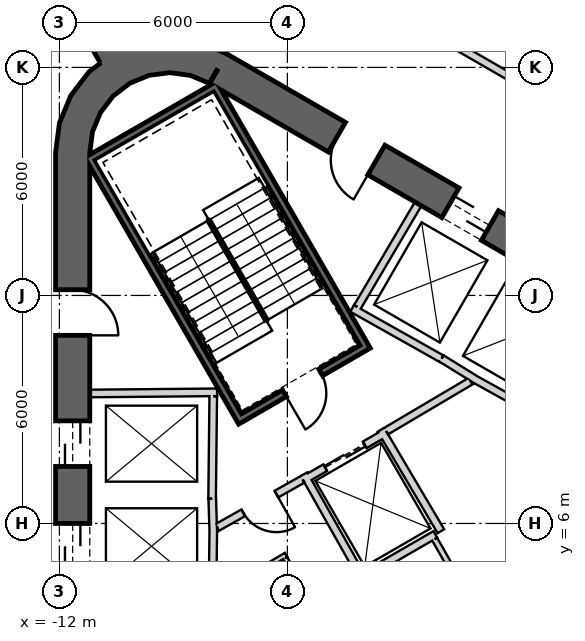
"""IFC4 building model, lengths in metres.
Left out: names, types, materials, properties, quantities, classifications, styles, units other than length and angle.
Written with IfcOpenShell. Run it as: python <this file> out.ifc"""

import sys

from ifc_helpers import new_model, si_unit, direction, frame, frame_2d, origin, place, context, subcontext, project, spatial, polyline, rectangle, outline, extrude, element, fill, save


model = new_model("IFC4")
c1 = context("Model", 3, precision=1e-05, world=origin(), true_north=direction((0.0, 1.0)))
c2 = subcontext(c1, "Body", "Model", "MODEL_VIEW")
j1 = project(units=[si_unit("LENGTHUNIT", "METRE"), si_unit("PLANEANGLEUNIT", "RADIAN")], contexts=[c1])
p1 = place(None, origin())
s1 = spatial("IfcSite", under=j1, at=p1, CompositionType="ELEMENT")
p2 = place(p1, origin())
s2 = spatial("IfcBuilding", under=s1, at=p2, CompositionType="ELEMENT")
p3 = place(p2, frame((0.0, 0.0, 45.5)))
s3 = spatial("IfcBuildingStorey", under=s2, at=p3, CompositionType="ELEMENT", Elevation=45.5)
p4 = place(p3, frame((19.475, 2.208, 0.0), z_axis=(0.0, 0.0, 1.0), x_axis=(-0.866028369851, 0.499994862586, 0.0)))
e1 = element("IfcWall", 1, at=p4, inside=s3, PredefinedType="SHEAR", context=c2, shape_type="SweptSolid", body=[
    extrude(rectangle(XDim=31.523, YDim=0.9, at=frame_2d((15.762, 0.0))), origin(), (0.0, 0.0, 1.0), 4.1),
])
p5 = place(p4, frame((7.062, 0.0, 0.0)))
e2 = element("IfcOpeningElement", 2, at=p5, cuts=e1, PredefinedType="OPENING", context=c2, shape_type="SweptSolid", body=[
    extrude(rectangle(XDim=1.2, YDim=2.4, at=frame_2d((0.6, 1.2))), frame((0.0, 0.46, 0.0), z_axis=(0.0, -1.0, 0.0), x_axis=(1.0, 0.0, 0.0)), (0.0, 0.0, 1.0), 0.92),
])
p6 = place(p4, frame((9.762, 0.0, 0.0)))
e3 = element("IfcOpeningElement", 3, at=p6, cuts=e1, PredefinedType="OPENING", context=c2, shape_type="SweptSolid", body=[
    extrude(rectangle(XDim=1.2, YDim=2.4, at=frame_2d((0.6, 1.2))), frame((0.0, 0.46, 0.0), z_axis=(0.0, -1.0, 0.0), x_axis=(1.0, 0.0, 0.0)), (0.0, 0.0, 1.0), 0.92),
])
p7 = place(p4, frame((12.462, 0.0, 0.0)))
e4 = element("IfcOpeningElement", 4, at=p7, cuts=e1, PredefinedType="OPENING", context=c2, shape_type="SweptSolid", body=[
    extrude(rectangle(XDim=1.2, YDim=2.4, at=frame_2d((0.6, 1.2))), frame((0.0, 0.46, 0.0), z_axis=(0.0, -1.0, 0.0), x_axis=(1.0, 0.0, 0.0)), (0.0, 0.0, 1.0), 0.92),
])
p8 = place(p4, frame((15.162, 0.0, 0.0)))
e5 = element("IfcOpeningElement", 5, at=p8, cuts=e1, PredefinedType="OPENING", context=c2, shape_type="SweptSolid", body=[
    extrude(rectangle(XDim=1.2, YDim=2.4, at=frame_2d((0.6, 1.2))), frame((0.0, 0.46, 0.0), z_axis=(0.0, -1.0, 0.0), x_axis=(1.0, 0.0, 0.0)), (0.0, 0.0, 1.0), 0.92),
])
p9 = place(p4, frame((17.862, 0.0, 0.0)))
e6 = element("IfcOpeningElement", 6, at=p9, cuts=e1, PredefinedType="OPENING", context=c2, shape_type="SweptSolid", body=[
    extrude(rectangle(XDim=1.2, YDim=2.4, at=frame_2d((0.6, 1.2))), frame((0.0, 0.46, 0.0), z_axis=(0.0, -1.0, 0.0), x_axis=(1.0, 0.0, 0.0)), (0.0, 0.0, 1.0), 0.92),
])
p10 = place(p4, frame((20.562, 0.0, 0.0)))
e7 = element("IfcOpeningElement", 7, at=p10, cuts=e1, PredefinedType="OPENING", context=c2, shape_type="SweptSolid", body=[
    extrude(rectangle(XDim=1.2, YDim=2.4, at=frame_2d((0.6, 1.2))), frame((0.0, 0.46, 0.0), z_axis=(0.0, -1.0, 0.0), x_axis=(1.0, 0.0, 0.0)), (0.0, 0.0, 1.0), 0.92),
])
p11 = place(p4, frame((23.262, 0.0, 0.0)))
e8 = element("IfcOpeningElement", 8, at=p11, cuts=e1, PredefinedType="OPENING", context=c2, shape_type="SweptSolid", body=[
    extrude(rectangle(XDim=1.2, YDim=2.4, at=frame_2d((0.6, 1.2))), frame((0.0, 0.46, 0.0), z_axis=(0.0, -1.0, 0.0), x_axis=(1.0, 0.0, 0.0)), (0.0, 0.0, 1.0), 0.92),
])
p12 = place(p4, frame((3.612, 0.0, 0.0)))
e9 = element("IfcOpeningElement", 9, at=p12, cuts=e1, PredefinedType="OPENING", context=c2, shape_type="SweptSolid", body=[
    extrude(rectangle(XDim=1.2, YDim=2.4, at=frame_2d((0.6, 1.2))), frame((0.0, 0.46, 0.0), z_axis=(0.0, -1.0, 0.0), x_axis=(1.0, 0.0, 0.0)), (0.0, 0.0, 1.0), 0.92),
])
p13 = place(p4, frame((26.712, 0.0, 0.0)))
e10 = element("IfcOpeningElement", 10, at=p13, cuts=e1, PredefinedType="OPENING", context=c2, shape_type="SweptSolid", body=[
    extrude(rectangle(XDim=1.2, YDim=2.4, at=frame_2d((0.6, 1.2))), frame((0.0, 0.46, 0.0), z_axis=(0.0, -1.0, 0.0), x_axis=(1.0, 0.0, 0.0)), (0.0, 0.0, 1.0), 0.92),
])
p14 = place(p3, frame((-11.65, 15.762, 0.0), z_axis=(0.0, 0.0, 1.0), x_axis=(0.0, -1.0, 0.0)))
e11 = element("IfcWall", 11, at=p14, inside=s3, PredefinedType="SHEAR", context=c2, shape_type="SweptSolid", body=[
    extrude(rectangle(XDim=31.523, YDim=0.9, at=frame_2d((15.762, 0.0))), origin(), (0.0, 0.0, 1.0), 4.1),
])
p15 = place(p14, frame((7.062, 0.0, 0.0)))
e12 = element("IfcOpeningElement", 12, at=p15, cuts=e11, PredefinedType="OPENING", context=c2, shape_type="SweptSolid", body=[
    extrude(rectangle(XDim=1.2, YDim=2.4, at=frame_2d((0.6, 1.2))), frame((0.0, 0.46, 0.0), z_axis=(0.0, -1.0, 0.0), x_axis=(1.0, 0.0, 0.0)), (0.0, 0.0, 1.0), 0.92),
])
p16 = place(p14, frame((9.762, 0.0, 0.0)))
e13 = element("IfcOpeningElement", 13, at=p16, cuts=e11, PredefinedType="OPENING", context=c2, shape_type="SweptSolid", body=[
    extrude(rectangle(XDim=1.2, YDim=2.4, at=frame_2d((0.6, 1.2))), frame((0.0, 0.46, 0.0), z_axis=(0.0, -1.0, 0.0), x_axis=(1.0, 0.0, 0.0)), (0.0, 0.0, 1.0), 0.92),
])
p17 = place(p14, frame((12.462, 0.0, 0.0)))
e14 = element("IfcOpeningElement", 14, at=p17, cuts=e11, PredefinedType="OPENING", context=c2, shape_type="SweptSolid", body=[
    extrude(rectangle(XDim=1.2, YDim=2.4, at=frame_2d((0.6, 1.2))), frame((0.0, 0.46, 0.0), z_axis=(0.0, -1.0, 0.0), x_axis=(1.0, 0.0, 0.0)), (0.0, 0.0, 1.0), 0.92),
])
p18 = place(p14, frame((15.162, 0.0, 0.0)))
e15 = element("IfcOpeningElement", 15, at=p18, cuts=e11, PredefinedType="OPENING", context=c2, shape_type="SweptSolid", body=[
    extrude(rectangle(XDim=1.2, YDim=2.4, at=frame_2d((0.6, 1.2))), frame((0.0, 0.46, 0.0), z_axis=(0.0, -1.0, 0.0), x_axis=(1.0, 0.0, 0.0)), (0.0, 0.0, 1.0), 0.92),
])
p19 = place(p14, frame((17.862, 0.0, 0.0)))
e16 = element("IfcOpeningElement", 16, at=p19, cuts=e11, PredefinedType="OPENING", context=c2, shape_type="SweptSolid", body=[
    extrude(rectangle(XDim=1.2, YDim=2.4, at=frame_2d((0.6, 1.2))), frame((0.0, 0.46, 0.0), z_axis=(0.0, -1.0, 0.0), x_axis=(1.0, 0.0, 0.0)), (0.0, 0.0, 1.0), 0.92),
])
p20 = place(p14, frame((20.562, 0.0, 0.0)))
e17 = element("IfcOpeningElement", 17, at=p20, cuts=e11, PredefinedType="OPENING", context=c2, shape_type="SweptSolid", body=[
    extrude(rectangle(XDim=1.2, YDim=2.4, at=frame_2d((0.6, 1.2))), frame((0.0, 0.46, 0.0), z_axis=(0.0, -1.0, 0.0), x_axis=(1.0, 0.0, 0.0)), (0.0, 0.0, 1.0), 0.92),
])
p21 = place(p14, frame((23.262, 0.0, 0.0)))
e18 = element("IfcOpeningElement", 18, at=p21, cuts=e11, PredefinedType="OPENING", context=c2, shape_type="SweptSolid", body=[
    extrude(rectangle(XDim=1.2, YDim=2.4, at=frame_2d((0.6, 1.2))), frame((0.0, 0.46, 0.0), z_axis=(0.0, -1.0, 0.0), x_axis=(1.0, 0.0, 0.0)), (0.0, 0.0, 1.0), 0.92),
])
p22 = place(p14, frame((3.612, 0.0, 0.0)))
e19 = element("IfcOpeningElement", 19, at=p22, cuts=e11, PredefinedType="OPENING", context=c2, shape_type="SweptSolid", body=[
    extrude(rectangle(XDim=1.2, YDim=2.4, at=frame_2d((0.6, 1.2))), frame((0.0, 0.46, 0.0), z_axis=(0.0, -1.0, 0.0), x_axis=(1.0, 0.0, 0.0)), (0.0, 0.0, 1.0), 0.92),
])
p23 = place(p14, frame((26.712, 0.0, 0.0)))
e20 = element("IfcOpeningElement", 20, at=p23, cuts=e11, PredefinedType="OPENING", context=c2, shape_type="SweptSolid", body=[
    extrude(rectangle(XDim=1.2, YDim=2.4, at=frame_2d((0.6, 1.2))), frame((0.0, 0.46, 0.0), z_axis=(0.0, -1.0, 0.0), x_axis=(1.0, 0.0, 0.0)), (0.0, 0.0, 1.0), 0.92),
])
p24 = place(p3, origin())
e21 = element("IfcWall", 21, at=p24, inside=s3, PredefinedType="SHEAR", context=c2, shape_type="SweptSolid", body=[
    extrude(outline(polyline([(-7.6, 18.36), (-8.323, 18.659), (-9.1, 18.762), (-9.876, 18.659), (-10.6, 18.36), (-11.221, 17.883), (-11.698, 17.262), (-11.998, 16.538), (-12.1, 15.762), (-11.2, 15.762), (-11.128, 16.305), (-10.919, 16.812), (-10.585, 17.247), (-10.15, 17.58), (-9.644, 17.79), (-9.1, 17.862), (-8.556, 17.79), (-8.05, 17.58), (-7.6, 18.36)])), origin(), (0.0, 0.0, 1.0), 4.1),
])
p25 = place(p3, frame((-10.575, 18.316, 0.0), z_axis=(0.0, 0.0, 1.0), x_axis=(-0.499996272984, 0.866027555568, 0.0)))
e22 = element("IfcWall", 22, at=p25, inside=s3, PredefinedType="SHEAR", context=c2, shape_type="SweptSolid", body=[
    extrude(rectangle(XDim=14.098, YDim=0.8, at=frame_2d((7.049, 0.0))), origin(), (0.0, 0.0, 1.0), 4.1),
])
p26 = place(p25, frame((0.7, 0.0, 0.0)))
e23 = element("IfcOpeningElement", 23, at=p26, cuts=e22, PredefinedType="OPENING", context=c2, shape_type="SweptSolid", body=[
    extrude(rectangle(XDim=1.4, YDim=2.4, at=frame_2d((0.7, 1.2))), frame((0.0, 0.41, 0.0), z_axis=(0.0, -1.0, 0.0), x_axis=(1.0, 0.0, 0.0)), (0.0, 0.0, 1.0), 0.82),
])
p27 = place(p3, frame((-11.2, 9.42, 0.0), z_axis=(0.0, 0.0, 1.0), x_axis=(0.999957167047, 0.009255488683, 0.0)))
e24 = element("IfcWall", 24, at=p27, inside=s3, PredefinedType="PLUMBINGWALL", context=c2, shape_type="SweptSolid", body=[
    extrude(rectangle(XDim=3.35, YDim=0.2, at=frame_2d((1.675, 0.0))), origin(), (0.0, 0.0, 1.0), 3.8),
])
p28 = place(p3, frame((-7.951, 9.35, 0.0), z_axis=(0.0, 0.0, 1.0), x_axis=(-0.011120469654, -0.999938165666, 0.0)))
e25 = element("IfcWall", 25, at=p28, inside=s3, PredefinedType="PLUMBINGWALL", context=c2, shape_type="SweptSolid", body=[
    extrude(rectangle(XDim=2.7, YDim=0.2, at=frame_2d((1.35, 0.0))), origin(), (0.0, 0.0, 1.0), 3.8),
])
p29 = place(p3, frame((-7.977, 6.65, 0.0), z_axis=(0.0, 0.0, 1.0), x_axis=(0.030861509705, -0.999523670164, 0.0)))
e26 = element("IfcWall", 26, at=p29, inside=s3, PredefinedType="PLUMBINGWALL", context=c2, shape_type="SweptSolid", body=[
    extrude(rectangle(XDim=0.878, YDim=0.2, at=frame_2d((0.439, 0.0))), origin(), (0.0, 0.0, 1.0), 3.8),
])
p30 = place(p3, frame((-7.949, 5.895, 0.0), z_axis=(0.0, 0.0, 1.0), x_axis=(-0.012042535896, -0.999927486035, 0.0)))
e27 = element("IfcWall", 27, at=p30, inside=s3, PredefinedType="PLUMBINGWALL", context=c2, shape_type="SweptSolid", body=[
    extrude(rectangle(XDim=1.845, YDim=0.2, at=frame_2d((0.922, 0.0))), origin(), (0.0, 0.0, 1.0), 3.8),
])
p31 = place(p3, frame((-1.941, 10.339, 0.0), z_axis=(0.0, 0.0, 1.0), x_axis=(0.850216889117, -0.526432561171, 0.0)))
e28 = element("IfcWall", 28, at=p31, inside=s3, PredefinedType="PLUMBINGWALL", context=c2, shape_type="SweptSolid", body=[
    extrude(rectangle(XDim=1.078, YDim=0.2, at=frame_2d((0.539, 0.0))), origin(), (0.0, 0.0, 1.0), 3.8),
])
p32 = place(p3, frame((0.483, 8.936, 0.0), z_axis=(0.0, 0.0, 1.0), x_axis=(-0.874269620932, 0.485440655401, 0.0)))
e29 = element("IfcWall", 29, at=p32, inside=s3, PredefinedType="PLUMBINGWALL", context=c2, shape_type="SweptSolid", body=[
    extrude(rectangle(XDim=1.845, YDim=0.2, at=frame_2d((0.922, 0.0))), origin(), (0.0, 0.0, 1.0), 3.8),
])
p33 = place(p3, frame((-4.296, 11.659, 0.0), z_axis=(0.0, 0.0, 1.0), x_axis=(0.871534483978, -0.490334215854, 0.0)))
e30 = element("IfcWall", 30, at=p33, inside=s3, PredefinedType="PLUMBINGWALL", context=c2, shape_type="SweptSolid", body=[
    extrude(rectangle(XDim=2.7, YDim=0.2, at=frame_2d((1.35, 0.0))), origin(), (0.0, 0.0, 1.0), 3.8),
])
p34 = place(p3, frame((-4.158, 11.696, 0.0), z_axis=(0.0, 0.0, 1.0), x_axis=(0.508018930956, 0.861345903683, 0.0)))
e31 = element("IfcWall", 31, at=p34, inside=s3, PredefinedType="PLUMBINGWALL", context=c2, shape_type="SweptSolid", body=[
    extrude(rectangle(XDim=3.15, YDim=0.2, at=frame_2d((1.575, 0.0))), origin(), (0.0, 0.0, 1.0), 3.8),
])
p35 = place(p3, frame((-11.245, 15.678, -0.3), z_axis=(0.0, 0.0, 1.0), x_axis=(0.499977274689, -0.866038523851, 0.0)))
e32 = element("IfcWall", 32, at=p35, inside=s3, PredefinedType="SHEAR", context=c2, shape_type="SweptSolid", body=[
    extrude(rectangle(XDim=8.1, YDim=0.2, at=frame_2d((4.05, 0.0))), origin(), (0.0, 0.0, 1.0), 4.1),
])
p36 = place(p3, frame((-7.818, 17.541, -0.3), z_axis=(0.0, 0.0, 1.0), x_axis=(-0.866044365799, -0.499967155389, 0.0)))
e33 = element("IfcWall", 33, at=p36, inside=s3, PredefinedType="SHEAR", context=c2, shape_type="SweptSolid", body=[
    extrude(rectangle(XDim=3.8, YDim=0.2, at=frame_2d((1.9, 0.0))), origin(), (0.0, 0.0, 1.0), 4.1),
])
p37 = place(p3, frame((-7.854, 17.405, -0.3), z_axis=(0.0, 0.0, 1.0), x_axis=(0.499997992926, -0.866026562566, 0.0)))
e34 = element("IfcWall", 34, at=p37, inside=s3, PredefinedType="SHEAR", context=c2, shape_type="SweptSolid", body=[
    extrude(rectangle(XDim=7.9, YDim=0.2, at=frame_2d((3.95, 0.0))), origin(), (0.0, 0.0, 1.0), 4.1),
])
p38 = place(p3, frame((-7.159, 8.8, -0.3), z_axis=(0.0, 0.0, 1.0), x_axis=(0.866047807691, 0.499961193289, 0.0)))
e35 = element("IfcWall", 35, at=p38, inside=s3, PredefinedType="SHEAR", context=c2, shape_type="SweptSolid", body=[
    extrude(rectangle(XDim=3.6, YDim=0.2, at=frame_2d((1.8, 0.0))), origin(), (0.0, 0.0, 1.0), 4.1),
])
p39 = place(p38, frame((1.25, 0.0, 0.3)))
e36 = element("IfcOpeningElement", 36, at=p39, cuts=e35, PredefinedType="OPENING", context=c2, shape_type="SweptSolid", body=[
    extrude(rectangle(XDim=1.1, YDim=2.1, at=frame_2d((0.55, 1.05))), frame((0.0, 0.11, 0.0), z_axis=(0.0, -1.0, 0.0), x_axis=(1.0, 0.0, 0.0)), (0.0, 0.0, 1.0), 0.22),
])
p40 = place(p3, frame((-5.524, 7.168, 0.0), z_axis=(0.0, 0.0, 1.0), x_axis=(0.866024647952, 0.500001309137, 0.0)))
e37 = element("IfcWall", 37, at=p40, inside=s3, PredefinedType="PLUMBINGWALL", context=c2, shape_type="SweptSolid", body=[
    extrude(rectangle(XDim=2.4, YDim=0.2, at=frame_2d((1.2, 0.0))), origin(), (0.0, 0.0, 1.0), 3.8),
])
p41 = place(p40, frame((0.6, 0.0, 0.0)))
e38 = element("IfcOpeningElement", 38, at=p41, cuts=e37, PredefinedType="OPENING", context=c2, shape_type="SweptSolid", body=[
    extrude(rectangle(XDim=1.2, YDim=2.4, at=frame_2d((0.6, 1.2))), frame((0.0, 0.11, 0.0), z_axis=(0.0, -1.0, 0.0), x_axis=(1.0, 0.0, 0.0)), (0.0, 0.0, 1.0), 0.22),
])
p42 = place(p3, frame((-3.538, 8.465, 0.0), z_axis=(0.0, 0.0, 1.0), x_axis=(0.508647062354, -0.860975125052, 0.0)))
e39 = element("IfcWall", 39, at=p42, inside=s3, PredefinedType="PLUMBINGWALL", context=c2, shape_type="SweptSolid", body=[
    extrude(rectangle(XDim=3.1, YDim=0.2, at=frame_2d((1.55, 0.0))), origin(), (0.0, 0.0, 1.0), 3.8),
])
p43 = place(p3, frame((-2.108, 5.711, 0.0), z_axis=(0.0, 0.0, 1.0), x_axis=(-0.866009305107, -0.50002788269, 0.0)))
e40 = element("IfcWall", 40, at=p43, inside=s3, PredefinedType="PLUMBINGWALL", context=c2, shape_type="SweptSolid", body=[
    extrude(rectangle(XDim=2.329, YDim=0.2, at=frame_2d((1.165, 0.0))), origin(), (0.0, 0.0, 1.0), 3.8),
])
p44 = place(p3, frame((-5.562, 7.296, 0.0), z_axis=(0.0, 0.0, 1.0), x_axis=(0.49134651263, -0.870964180966, 0.0)))
e41 = element("IfcWall", 41, at=p44, inside=s3, PredefinedType="PLUMBINGWALL", context=c2, shape_type="SweptSolid", body=[
    extrude(rectangle(XDim=3.0, YDim=0.2, at=frame_2d((1.5, 0.0))), origin(), (0.0, 0.0, 1.0), 3.8),
])
p45 = place(p3, frame((-1.18, 9.744, 0.0), z_axis=(0.0, 0.0, 1.0), x_axis=(-0.860615607571, -0.509255118781, 0.0)))
e42 = element("IfcWall", 42, at=p45, inside=s3, PredefinedType="PARTITIONING", context=c2, shape_type="SweptSolid", body=[
    extrude(rectangle(XDim=2.581, YDim=0.2, at=frame_2d((1.29, 0.0))), origin(), (0.0, 0.0, 1.0), 3.8),
])
p46 = place(p3, frame((-5.6, 7.16, 0.0), z_axis=(0.0, 0.0, 1.0), x_axis=(-0.871363259478, -0.490638431059, 0.0)))
e43 = element("IfcWall", 43, at=p46, inside=s3, PredefinedType="PARTITIONING", context=c2, shape_type="SweptSolid", body=[
    extrude(rectangle(XDim=2.581, YDim=0.2, at=frame_2d((1.291, 0.0))), origin(), (0.0, 0.0, 1.0), 3.8),
])
p47 = place(p46, frame((0.791, 0.0, 0.0)))
e44 = element("IfcOpeningElement", 44, at=p47, cuts=e43, PredefinedType="OPENING", context=c2, shape_type="SweptSolid", body=[
    extrude(rectangle(XDim=1.0, YDim=2.1, at=frame_2d((0.5, 1.05))), frame((0.0, 0.11, 0.0), z_axis=(0.0, -1.0, 0.0), x_axis=(1.0, 0.0, 0.0)), (0.0, 0.0, 1.0), 0.22),
])
p48 = place(p3, frame((-2.124, 5.586, 0.0), z_axis=(0.0, 0.0, 1.0), x_axis=(0.494514430604, -0.869169418424, 0.0)))
e45 = element("IfcWall", 45, at=p48, inside=s3, PredefinedType="PLUMBINGWALL", context=c2, shape_type="SweptSolid", body=[
    extrude(rectangle(XDim=4.534, YDim=0.15, at=frame_2d((2.267, 0.0))), origin(), (0.0, 0.0, 1.0), 3.8),
])
p49 = place(p3, frame((-6.037, 5.176, 0.0), z_axis=(0.0, 0.0, 1.0), x_axis=(-0.860106072674, -0.510115225953, 0.0)))
e46 = element("IfcWall", 46, at=p49, inside=s3, PredefinedType="PARTITIONING", context=c2, shape_type="SweptSolid", body=[
    extrude(rectangle(XDim=2.225, YDim=0.12, at=frame_2d((1.112, 0.0))), origin(), (0.0, 0.0, 1.0), 3.8),
])
p50 = place(p3, frame((-4.983, 3.172, 0.0), z_axis=(0.0, 0.0, 1.0), x_axis=(-0.488728310113, 0.872436037136, 0.0)))
e47 = element("IfcWall", 47, at=p50, inside=s3, PredefinedType="PARTITIONING", context=c2, shape_type="SweptSolid", body=[
    extrude(rectangle(XDim=2.201, YDim=0.12, at=frame_2d((1.101, 0.0))), origin(), (0.0, 0.0, 1.0), 3.8),
])
p51 = place(p3, frame((16.423, 8.185, 0.0), z_axis=(0.0, 0.0, 1.0), x_axis=(-0.866026561282, 0.49999799515, 0.0)))
e48 = element("IfcWall", 48, at=p51, inside=s3, PredefinedType="PARTITIONING", context=c2, shape_type="SweptSolid", body=[
    extrude(rectangle(XDim=26.435, YDim=0.2, at=frame_2d((13.218, 0.0))), origin(), (0.0, 0.0, 1.0), 2.98),
])
p52 = place(p51, frame((14.356, 0.0, 0.0)))
e49 = element("IfcOpeningElement", 49, at=p52, cuts=e48, PredefinedType="OPENING", context=c2, shape_type="SweptSolid", body=[
    extrude(rectangle(XDim=1.0, YDim=2.1, at=frame_2d((0.5, 1.05))), frame((0.0, 0.11, 0.0), z_axis=(0.0, -1.0, 0.0), x_axis=(1.0, 0.0, 0.0)), (0.0, 0.0, 1.0), 0.22),
])
p53 = place(p51, frame((1.139, 0.0, 0.0)))
e50 = element("IfcOpeningElement", 50, at=p53, cuts=e48, PredefinedType="OPENING", context=c2, shape_type="SweptSolid", body=[
    extrude(rectangle(XDim=1.0, YDim=2.1, at=frame_2d((0.5, 1.05))), frame((0.0, 0.11, 0.0), z_axis=(0.0, -1.0, 0.0), x_axis=(1.0, 0.0, 0.0)), (0.0, 0.0, 1.0), 0.22),
])
p54 = place(p39, origin())
e51 = element("IfcDoor", 51, at=p54, inside=s3, OperationType="SINGLE_SWING_LEFT", PredefinedType="USERDEFINED", context=c2, shape_type="SweptSolid", body=[
    extrude(rectangle(XDim=1.1, YDim=2.1, at=frame_2d((0.55, 1.05))), frame((0.0, 0.025, 0.0), z_axis=(0.0, -1.0, 0.0), x_axis=(1.0, 0.0, 0.0)), (0.0, 0.0, 1.0), 0.05),
])
fill(e36, e51)
p55 = place(p47, origin())
e52 = element("IfcDoor", 52, at=p55, inside=s3, OperationType="SINGLE_SWING_RIGHT", PredefinedType="USERDEFINED", context=c2, shape_type="SweptSolid", body=[
    extrude(rectangle(XDim=1.0, YDim=2.1, at=frame_2d((0.5, 1.05))), frame((0.0, 0.025, 0.0), z_axis=(0.0, -1.0, 0.0), x_axis=(1.0, 0.0, 0.0)), (0.0, 0.0, 1.0), 0.05),
])
fill(e44, e52)
p56 = place(p41, origin())
e53 = element("IfcDoor", 53, at=p56, inside=s3, OperationType="SLIDING_TO_LEFT", PredefinedType="USERDEFINED", context=c2, shape_type="SweptSolid", body=[
    extrude(rectangle(XDim=1.2, YDim=2.4, at=frame_2d((0.6, 1.2))), frame((0.0, 0.025, 0.0), z_axis=(0.0, -1.0, 0.0), x_axis=(1.0, 0.0, 0.0)), (0.0, 0.0, 1.0), 0.05),
])
fill(e38, e53)
p57 = place(p15, origin())
e54 = element("IfcDoor", 54, at=p57, inside=s3, OperationType="SLIDING_TO_LEFT", PredefinedType="USERDEFINED", context=c2, shape_type="SweptSolid", body=[
    extrude(rectangle(XDim=1.2, YDim=2.4, at=frame_2d((0.6, 1.2))), frame((0.0, 0.025, 0.0), z_axis=(0.0, -1.0, 0.0), x_axis=(1.0, 0.0, 0.0)), (0.0, 0.0, 1.0), 0.05),
])
fill(e12, e54)
p58 = place(p16, origin())
e55 = element("IfcDoor", 55, at=p58, inside=s3, OperationType="SLIDING_TO_LEFT", PredefinedType="USERDEFINED", context=c2, shape_type="SweptSolid", body=[
    extrude(rectangle(XDim=1.2, YDim=2.4, at=frame_2d((0.6, 1.2))), frame((0.0, 0.025, 0.0), z_axis=(0.0, -1.0, 0.0), x_axis=(1.0, 0.0, 0.0)), (0.0, 0.0, 1.0), 0.05),
])
fill(e13, e55)
p59 = place(p11, origin())
e56 = element("IfcDoor", 56, at=p59, inside=s3, OperationType="SLIDING_TO_LEFT", PredefinedType="USERDEFINED", context=c2, shape_type="SweptSolid", body=[
    extrude(rectangle(XDim=1.2, YDim=2.4, at=frame_2d((0.6, 1.2))), frame((0.0, 0.025, 0.0), z_axis=(0.0, -1.0, 0.0), x_axis=(1.0, 0.0, 0.0)), (0.0, 0.0, 1.0), 0.05),
])
fill(e8, e56)
p60 = place(p13, origin())
e57 = element("IfcDoor", 57, at=p60, inside=s3, OperationType="SINGLE_SWING_RIGHT", PredefinedType="USERDEFINED", context=c2, shape_type="SweptSolid", body=[
    extrude(rectangle(XDim=1.2, YDim=2.4, at=frame_2d((0.6, 1.2))), frame((0.0, 0.025, 0.0), z_axis=(0.0, -1.0, 0.0), x_axis=(1.0, 0.0, 0.0)), (0.0, 0.0, 1.0), 0.05),
])
fill(e10, e57)
p61 = place(p22, origin())
e58 = element("IfcDoor", 58, at=p61, inside=s3, OperationType="SINGLE_SWING_RIGHT", PredefinedType="USERDEFINED", context=c2, shape_type="SweptSolid", body=[
    extrude(rectangle(XDim=1.2, YDim=2.4, at=frame_2d((0.6, 1.2))), frame((0.0, 0.025, 0.0), z_axis=(0.0, -1.0, 0.0), x_axis=(1.0, 0.0, 0.0)), (0.0, 0.0, 1.0), 0.05),
])
fill(e19, e58)
save(model, sys.argv[1])
